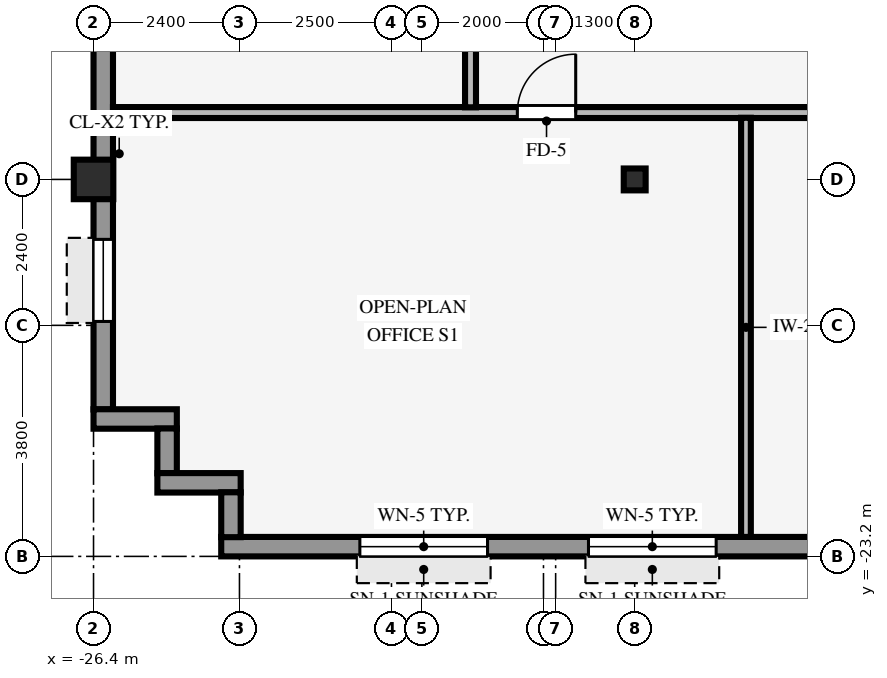
"""IFC4 building model, lengths in metres.
Left out: names, types, materials, properties, quantities, classifications, styles, units other than length and angle.
Written with IfcOpenShell. Run it as: python <this file> out.ifc"""

import sys

from ifc_helpers import new_model, si_unit, direction, frame, frame_2d, origin, origin_2d, place, context, subcontext, project, spatial, rectangle, hollow_rectangle, i_section, extrude, source, transform, mapped, element, fill, save


model = new_model("IFC4")
c1 = context("Model", 3, precision=1e-05, world=origin(), true_north=direction((0.0, 1.0)))
c2 = subcontext(c1, "Body", "Model", "MODEL_VIEW")
j1 = project(units=[si_unit("LENGTHUNIT", "METRE"), si_unit("PLANEANGLEUNIT", "RADIAN")], contexts=[c1])
p1 = place(None, origin())
s1 = spatial("IfcSite", under=j1, at=p1, CompositionType="ELEMENT")
p2 = place(p1, origin())
s2 = spatial("IfcBuilding", under=s1, at=p2, CompositionType="ELEMENT")
p3 = place(p2, frame((0.0, 0.0, 164.0)))
s3 = spatial("IfcBuildingStorey", under=s2, at=p3, CompositionType="ELEMENT", Elevation=164.0)
p4 = place(p3, frame((-26.4, -17.0, 0.0), z_axis=(0.0, 0.0, 1.0), x_axis=(1.0, 0.0, 0.0)))
e1 = element("IfcColumn", 1, at=p4, inside=s3, PredefinedType="COLUMN", context=c2, shape_type="SweptSolid", body=[
    extrude(hollow_rectangle(XDim=0.65, YDim=0.65, WallThickness=0.04, InnerFilletRadius=0.04, OuterFilletRadius=0.08, at=origin_2d()), origin(), (0.0, 0.0, 1.0), 3.25),
])
p5 = place(p3, frame((-17.5, -17.0, 0.0), z_axis=(0.0, 0.0, 1.0), x_axis=(1.0, 0.0, 0.0)))
e2 = element("IfcColumn", 2, at=p5, inside=s3, PredefinedType="COLUMN", context=c2, shape_type="SweptSolid", body=[
    extrude(i_section(OverallWidth=0.36, OverallDepth=0.36, WebThickness=0.021, FlangeThickness=0.021, FilletRadius=0.018, at=origin_2d()), origin(), (0.0, 0.0, 1.0), 3.25),
])
p6 = place(p3, frame((-24.3, -23.04, 0.0), z_axis=(0.0, 0.0, 1.0), x_axis=(1.0, 0.0, 0.0)))
e3 = element("IfcWall", 3, at=p6, inside=s3, PredefinedType="STANDARD", context=c2, shape_type="SweptSolid", body=[
    extrude(rectangle(XDim=48.6, YDim=0.32, at=frame_2d((24.3, 0.0))), origin(), (0.0, 0.0, 1.0), 2.585),
])
p7 = place(p6, frame((19.98, 0.0, 0.0), z_axis=(0.0, 0.0, 1.0), x_axis=(-1.0, 0.0, 0.0)))
e4 = element("IfcOpeningElement", 4, at=p7, cuts=e3, PredefinedType="OPENING", context=c2, shape_type="SweptSolid", body=[
    extrude(rectangle(XDim=0.98, YDim=2.15, at=frame_2d((0.49, 1.075))), frame((0.0, 0.17, 0.0), z_axis=(0.0, -1.0, 0.0), x_axis=(1.0, 0.0, 0.0)), (0.0, 0.0, 1.0), 0.34),
])
p8 = place(p6, frame((2.28, 0.0, 0.8)))
e5 = element("IfcOpeningElement", 5, at=p8, cuts=e3, PredefinedType="OPENING", context=c2, shape_type="SweptSolid", body=[
    extrude(rectangle(XDim=2.1, YDim=1.56, at=frame_2d((1.05, 0.78))), frame((0.0, 0.17, 0.0), z_axis=(0.0, -1.0, 0.0), x_axis=(1.0, 0.0, 0.0)), (0.0, 0.0, 1.0), 0.34),
])
p9 = place(p6, frame((6.04, 0.0, 0.8)))
e6 = element("IfcOpeningElement", 6, at=p9, cuts=e3, PredefinedType="OPENING", context=c2, shape_type="SweptSolid", body=[
    extrude(rectangle(XDim=2.1, YDim=1.56, at=frame_2d((1.05, 0.78))), frame((0.0, 0.17, 0.0), z_axis=(0.0, -1.0, 0.0), x_axis=(1.0, 0.0, 0.0)), (0.0, 0.0, 1.0), 0.34),
])
p10 = place(p6, frame((11.6, 0.0, 0.8)))
e7 = element("IfcOpeningElement", 7, at=p10, cuts=e3, PredefinedType="OPENING", context=c2, shape_type="SweptSolid", body=[
    extrude(rectangle(XDim=2.1, YDim=1.56, at=frame_2d((1.05, 0.78))), frame((0.0, 0.17, 0.0), z_axis=(0.0, -1.0, 0.0), x_axis=(1.0, 0.0, 0.0)), (0.0, 0.0, 1.0), 0.34),
])
p11 = place(p6, frame((20.92, 0.0, 0.8)))
e8 = element("IfcOpeningElement", 8, at=p11, cuts=e3, PredefinedType="OPENING", context=c2, shape_type="SweptSolid", body=[
    extrude(rectangle(XDim=2.1, YDim=1.56, at=frame_2d((1.05, 0.78))), frame((0.0, 0.17, 0.0), z_axis=(0.0, -1.0, 0.0), x_axis=(1.0, 0.0, 0.0)), (0.0, 0.0, 1.0), 0.34),
])
p12 = place(p6, frame((26.93, 0.0, 0.8)))
e9 = element("IfcOpeningElement", 9, at=p12, cuts=e3, PredefinedType="OPENING", context=c2, shape_type="SweptSolid", body=[
    extrude(rectangle(XDim=2.1, YDim=1.56, at=frame_2d((1.05, 0.78))), frame((0.0, 0.17, 0.0), z_axis=(0.0, -1.0, 0.0), x_axis=(1.0, 0.0, 0.0)), (0.0, 0.0, 1.0), 0.34),
])
p13 = place(p6, frame((30.24, 0.0, 0.8)))
e10 = element("IfcOpeningElement", 10, at=p13, cuts=e3, PredefinedType="OPENING", context=c2, shape_type="SweptSolid", body=[
    extrude(rectangle(XDim=2.1, YDim=1.56, at=frame_2d((1.05, 0.78))), frame((0.0, 0.17, 0.0), z_axis=(0.0, -1.0, 0.0), x_axis=(1.0, 0.0, 0.0)), (0.0, 0.0, 1.0), 0.34),
])
p14 = place(p6, frame((35.35, 0.0, 0.8)))
e11 = element("IfcOpeningElement", 11, at=p14, cuts=e3, PredefinedType="OPENING", context=c2, shape_type="SweptSolid", body=[
    extrude(rectangle(XDim=2.1, YDim=1.56, at=frame_2d((1.05, 0.78))), frame((0.0, 0.17, 0.0), z_axis=(0.0, -1.0, 0.0), x_axis=(1.0, 0.0, 0.0)), (0.0, 0.0, 1.0), 0.34),
])
p15 = place(p6, frame((39.56, 0.0, 0.8)))
e12 = element("IfcOpeningElement", 12, at=p15, cuts=e3, PredefinedType="OPENING", context=c2, shape_type="SweptSolid", body=[
    extrude(rectangle(XDim=2.1, YDim=1.56, at=frame_2d((1.05, 0.78))), frame((0.0, 0.17, 0.0), z_axis=(0.0, -1.0, 0.0), x_axis=(1.0, 0.0, 0.0)), (0.0, 0.0, 1.0), 0.34),
])
p16 = place(p6, frame((44.22, 0.0, 0.8)))
e13 = element("IfcOpeningElement", 13, at=p16, cuts=e3, PredefinedType="OPENING", context=c2, shape_type="SweptSolid", body=[
    extrude(rectangle(XDim=2.1, YDim=1.56, at=frame_2d((1.05, 0.78))), frame((0.0, 0.17, 0.0), z_axis=(0.0, -1.0, 0.0), x_axis=(1.0, 0.0, 0.0)), (0.0, 0.0, 1.0), 0.34),
])
p17 = place(p3, frame((-26.24, -20.784, 0.0), z_axis=(0.0, 0.0, 1.0), x_axis=(0.0, 1.0, 0.0)))
e14 = element("IfcWall", 14, at=p17, inside=s3, PredefinedType="STANDARD", context=c2, shape_type="SweptSolid", body=[
    extrude(rectangle(XDim=41.568, YDim=0.32, at=frame_2d((20.784, 0.0))), origin(), (0.0, 0.0, 1.0), 2.585),
])
p18 = place(p17, frame((1.448, 0.0, 0.8)))
e15 = element("IfcOpeningElement", 15, at=p18, cuts=e14, PredefinedType="OPENING", context=c2, shape_type="SweptSolid", body=[
    extrude(rectangle(XDim=1.35, YDim=1.56, at=frame_2d((0.675, 0.78))), frame((0.0, 0.17, 0.0), z_axis=(0.0, -1.0, 0.0), x_axis=(1.0, 0.0, 0.0)), (0.0, 0.0, 1.0), 0.34),
])
p19 = place(p17, frame((7.744, 0.0, 0.8)))
e16 = element("IfcOpeningElement", 16, at=p19, cuts=e14, PredefinedType="OPENING", context=c2, shape_type="SweptSolid", body=[
    extrude(rectangle(XDim=1.35, YDim=1.56, at=frame_2d((0.675, 0.78))), frame((0.0, 0.17, 0.0), z_axis=(0.0, -1.0, 0.0), x_axis=(1.0, 0.0, 0.0)), (0.0, 0.0, 1.0), 0.34),
])
p20 = place(p17, frame((13.14, 0.0, 0.8)))
e17 = element("IfcOpeningElement", 17, at=p20, cuts=e14, PredefinedType="OPENING", context=c2, shape_type="SweptSolid", body=[
    extrude(rectangle(XDim=1.35, YDim=1.56, at=frame_2d((0.675, 0.78))), frame((0.0, 0.17, 0.0), z_axis=(0.0, -1.0, 0.0), x_axis=(1.0, 0.0, 0.0)), (0.0, 0.0, 1.0), 0.34),
])
p21 = place(p17, frame((17.636, 0.0, 0.8)))
e18 = element("IfcOpeningElement", 18, at=p21, cuts=e14, PredefinedType="OPENING", context=c2, shape_type="SweptSolid", body=[
    extrude(rectangle(XDim=1.35, YDim=1.56, at=frame_2d((0.675, 0.78))), frame((0.0, 0.17, 0.0), z_axis=(0.0, -1.0, 0.0), x_axis=(1.0, 0.0, 0.0)), (0.0, 0.0, 1.0), 0.34),
])
p22 = place(p17, frame((22.582, 0.0, 0.8)))
e19 = element("IfcOpeningElement", 19, at=p22, cuts=e14, PredefinedType="OPENING", context=c2, shape_type="SweptSolid", body=[
    extrude(rectangle(XDim=1.35, YDim=1.56, at=frame_2d((0.675, 0.78))), frame((0.0, 0.17, 0.0), z_axis=(0.0, -1.0, 0.0), x_axis=(1.0, 0.0, 0.0)), (0.0, 0.0, 1.0), 0.34),
])
p23 = place(p17, frame((27.078, 0.0, 0.8)))
e20 = element("IfcOpeningElement", 20, at=p23, cuts=e14, PredefinedType="OPENING", context=c2, shape_type="SweptSolid", body=[
    extrude(rectangle(XDim=1.35, YDim=1.56, at=frame_2d((0.675, 0.78))), frame((0.0, 0.17, 0.0), z_axis=(0.0, -1.0, 0.0), x_axis=(1.0, 0.0, 0.0)), (0.0, 0.0, 1.0), 0.34),
])
p24 = place(p17, frame((32.474, 0.0, 0.8)))
e21 = element("IfcOpeningElement", 21, at=p24, cuts=e14, PredefinedType="OPENING", context=c2, shape_type="SweptSolid", body=[
    extrude(rectangle(XDim=1.35, YDim=1.56, at=frame_2d((0.675, 0.78))), frame((0.0, 0.17, 0.0), z_axis=(0.0, -1.0, 0.0), x_axis=(1.0, 0.0, 0.0)), (0.0, 0.0, 1.0), 0.34),
])
p25 = place(p17, frame((38.77, 0.0, 0.8)))
e22 = element("IfcOpeningElement", 22, at=p25, cuts=e14, PredefinedType="OPENING", context=c2, shape_type="SweptSolid", body=[
    extrude(rectangle(XDim=1.35, YDim=1.56, at=frame_2d((0.675, 0.78))), frame((0.0, 0.17, 0.0), z_axis=(0.0, -1.0, 0.0), x_axis=(1.0, 0.0, 0.0)), (0.0, 0.0, 1.0), 0.34),
])
p26 = place(p3, frame((-26.4, -20.94, 0.0), z_axis=(0.0, 0.0, 1.0), x_axis=(1.0, 0.0, 0.0)))
e23 = element("IfcWall", 23, at=p26, inside=s3, PredefinedType="STANDARD", context=c2, shape_type="SweptSolid", body=[
    extrude(rectangle(XDim=1.37, YDim=0.32, at=frame_2d((0.685, 0.0))), origin(), (0.0, 0.0, 1.0), 3.24),
])
p27 = place(p3, frame((-25.19, -21.834, 0.0), z_axis=(0.0, 0.0, 1.0), x_axis=(0.0, 1.0, 0.0)))
e24 = element("IfcWall", 24, at=p27, inside=s3, PredefinedType="STANDARD", context=c2, shape_type="SweptSolid", body=[
    extrude(rectangle(XDim=0.738, YDim=0.32, at=frame_2d((0.369, 0.0))), origin(), (0.0, 0.0, 1.0), 3.24),
])
p28 = place(p3, frame((-25.35, -21.99, 0.0), z_axis=(0.0, 0.0, 1.0), x_axis=(1.0, 0.0, 0.0)))
e25 = element("IfcWall", 25, at=p28, inside=s3, PredefinedType="STANDARD", context=c2, shape_type="SweptSolid", body=[
    extrude(rectangle(XDim=1.37, YDim=0.32, at=frame_2d((0.685, 0.0))), origin(), (0.0, 0.0, 1.0), 3.24),
])
p29 = place(p3, frame((-24.14, -22.884, 0.0), z_axis=(0.0, 0.0, 1.0), x_axis=(0.0, 1.0, 0.0)))
e26 = element("IfcWall", 26, at=p29, inside=s3, PredefinedType="STANDARD", context=c2, shape_type="SweptSolid", body=[
    extrude(rectangle(XDim=0.738, YDim=0.32, at=frame_2d((0.369, 0.0))), origin(), (0.0, 0.0, 1.0), 3.24),
])
p30 = place(p3, frame((-26.08, -15.9, 0.0), z_axis=(0.0, 0.0, 1.0), x_axis=(1.0, 0.0, 0.0)))
e27 = element("IfcWall", 27, at=p30, inside=s3, PredefinedType="PARTITIONING", context=c2, shape_type="SweptSolid", body=[
    extrude(rectangle(XDim=52.16, YDim=0.18, at=frame_2d((26.08, 0.0))), origin(), (0.0, 0.0, 1.0), 3.24),
])
p31 = place(p30, frame((41.35, 0.0, 0.0)))
e28 = element("IfcOpeningElement", 28, at=p31, cuts=e27, PredefinedType="OPENING", context=c2, shape_type="SweptSolid", body=[
    extrude(rectangle(XDim=0.96, YDim=2.1, at=frame_2d((0.48, 1.05))), frame((0.0, 0.1, 0.0), z_axis=(0.0, -1.0, 0.0), x_axis=(1.0, 0.0, 0.0)), (0.0, 0.0, 1.0), 0.2),
])
p32 = place(p30, frame((23.34, 0.0, 0.0)))
e29 = element("IfcOpeningElement", 29, at=p32, cuts=e27, PredefinedType="OPENING", context=c2, shape_type="SweptSolid", body=[
    extrude(rectangle(XDim=0.96, YDim=2.1, at=frame_2d((0.48, 1.05))), frame((0.0, 0.1, 0.0), z_axis=(0.0, -1.0, 0.0), x_axis=(1.0, 0.0, 0.0)), (0.0, 0.0, 1.0), 0.2),
])
p33 = place(p30, frame((14.4, 0.0, 0.0)))
e30 = element("IfcOpeningElement", 30, at=p33, cuts=e27, PredefinedType="OPENING", context=c2, shape_type="SweptSolid", body=[
    extrude(rectangle(XDim=0.96, YDim=2.1, at=frame_2d((0.48, 1.05))), frame((0.0, 0.1, 0.0), z_axis=(0.0, -1.0, 0.0), x_axis=(1.0, 0.0, 0.0)), (0.0, 0.0, 1.0), 0.2),
])
p34 = place(p30, frame((30.005, 0.0, 0.0)))
e31 = element("IfcOpeningElement", 31, at=p34, cuts=e27, PredefinedType="OPENING", context=c2, shape_type="SweptSolid", body=[
    extrude(rectangle(XDim=0.96, YDim=2.1, at=frame_2d((0.48, 1.05))), frame((0.0, 0.1, 0.0), z_axis=(0.0, -1.0, 0.0), x_axis=(1.0, 0.0, 0.0)), (0.0, 0.0, 1.0), 0.2),
])
p35 = place(p30, frame((6.65, 0.0, 0.0)))
e32 = element("IfcOpeningElement", 32, at=p35, cuts=e27, PredefinedType="OPENING", context=c2, shape_type="SweptSolid", body=[
    extrude(rectangle(XDim=0.96, YDim=2.1, at=frame_2d((0.48, 1.05))), frame((0.0, 0.1, 0.0), z_axis=(0.0, -1.0, 0.0), x_axis=(1.0, 0.0, 0.0)), (0.0, 0.0, 1.0), 0.2),
])
p36 = place(p3, frame((-20.2, -15.814, 0.0), z_axis=(0.0, 0.0, 1.0), x_axis=(0.0, 1.0, 0.0)))
e33 = element("IfcWall", 33, at=p36, inside=s3, PredefinedType="PARTITIONING", context=c2, shape_type="SweptSolid", body=[
    extrude(rectangle(XDim=31.628, YDim=0.18, at=frame_2d((15.814, 0.0))), origin(), (0.0, 0.0, 1.0), 3.24),
])
p37 = place(p36, frame((11.434, 0.0, 0.0)))
e34 = element("IfcOpeningElement", 34, at=p37, cuts=e33, PredefinedType="OPENING", context=c2, shape_type="SweptSolid", body=[
    extrude(rectangle(XDim=0.96, YDim=2.1, at=frame_2d((0.48, 1.05))), frame((0.0, 0.1, 0.0), z_axis=(0.0, -1.0, 0.0), x_axis=(1.0, 0.0, 0.0)), (0.0, 0.0, 1.0), 0.2),
])
p38 = place(p36, frame((19.634, 0.0, 0.0)))
e35 = element("IfcOpeningElement", 35, at=p38, cuts=e33, PredefinedType="OPENING", context=c2, shape_type="SweptSolid", body=[
    extrude(rectangle(XDim=0.96, YDim=2.1, at=frame_2d((0.48, 1.05))), frame((0.0, 0.1, 0.0), z_axis=(0.0, -1.0, 0.0), x_axis=(1.0, 0.0, 0.0)), (0.0, 0.0, 1.0), 0.2),
])
p39 = place(p36, frame((4.484, 0.0, 0.0)))
e36 = element("IfcOpeningElement", 36, at=p39, cuts=e33, PredefinedType="OPENING", context=c2, shape_type="SweptSolid", body=[
    extrude(rectangle(XDim=0.96, YDim=2.1, at=frame_2d((0.48, 1.05))), frame((0.0, 0.1, 0.0), z_axis=(0.0, -1.0, 0.0), x_axis=(1.0, 0.0, 0.0)), (0.0, 0.0, 1.0), 0.2),
])
p40 = place(p36, frame((26.184, 0.0, 0.0)))
e37 = element("IfcOpeningElement", 37, at=p40, cuts=e33, PredefinedType="OPENING", context=c2, shape_type="SweptSolid", body=[
    extrude(rectangle(XDim=0.96, YDim=2.1, at=frame_2d((0.48, 1.05))), frame((0.0, 0.1, 0.0), z_axis=(0.0, -1.0, 0.0), x_axis=(1.0, 0.0, 0.0)), (0.0, 0.0, 1.0), 0.2),
])
p41 = place(p3, frame((-15.67, -22.88, 0.0), z_axis=(0.0, 0.0, 1.0), x_axis=(0.0, 1.0, 0.0)))
e38 = element("IfcWall", 38, at=p41, inside=s3, PredefinedType="PARTITIONING", context=c2, shape_type="SweptSolid", body=[
    extrude(rectangle(XDim=6.894, YDim=0.16, at=frame_2d((3.447, 0.0))), origin(), (0.0, 0.0, 1.0), 3.24),
])
m1 = source(origin(), c2, "Body", "SweptSolid", [
    extrude(rectangle(XDim=2.1, YDim=1.56, at=frame_2d((1.05, 0.78))), frame((0.0, 0.03, 0.0), z_axis=(0.0, -1.0, 0.0), x_axis=(1.0, 0.0, 0.0)), (0.0, 0.0, 1.0), 0.06),
])
p42 = place(p8, origin())
e39 = element("IfcWindow", 39, at=p42, inside=s3, PartitioningType="SINGLE_PANEL", PredefinedType="WINDOW", context=c2, shape_type="MappedRepresentation", body=[
    mapped(m1, transform((0.0, 0.0, 0.0), scale=1.0)),
])
fill(e5, e39)
p43 = place(p9, origin())
e40 = element("IfcWindow", 40, at=p43, inside=s3, PartitioningType="SINGLE_PANEL", PredefinedType="WINDOW", context=c2, shape_type="MappedRepresentation", body=[
    mapped(m1, transform((0.0, 0.0, 0.0), scale=1.0)),
])
fill(e6, e40)
m2 = source(origin(), c2, "Body", "SweptSolid", [
    extrude(rectangle(XDim=1.35, YDim=1.56, at=frame_2d((0.675, 0.78))), frame((0.0, 0.03, 0.0), z_axis=(0.0, -1.0, 0.0), x_axis=(1.0, 0.0, 0.0)), (0.0, 0.0, 1.0), 0.06),
])
p44 = place(p18, origin())
e41 = element("IfcWindow", 41, at=p44, inside=s3, PartitioningType="SINGLE_PANEL", PredefinedType="WINDOW", context=c2, shape_type="MappedRepresentation", body=[
    mapped(m2, transform((0.0, 0.0, 0.0), scale=1.0)),
])
fill(e15, e41)
m3 = source(origin(), c2, "Body", "SweptSolid", [
    extrude(rectangle(XDim=0.96, YDim=2.1, at=frame_2d((0.48, 1.05))), frame((0.0, 0.025, 0.0), z_axis=(0.0, -1.0, 0.0), x_axis=(1.0, 0.0, 0.0)), (0.0, 0.0, 1.0), 0.05),
])
p45 = place(p35, origin())
e42 = element("IfcDoor", 42, at=p45, inside=s3, OperationType="SINGLE_SWING_RIGHT", PredefinedType="DOOR", context=c2, shape_type="MappedRepresentation", body=[
    mapped(m3, transform((0.0, 0.0, 0.0), scale=1.0)),
])
fill(e32, e42)
save(model, sys.argv[1])
